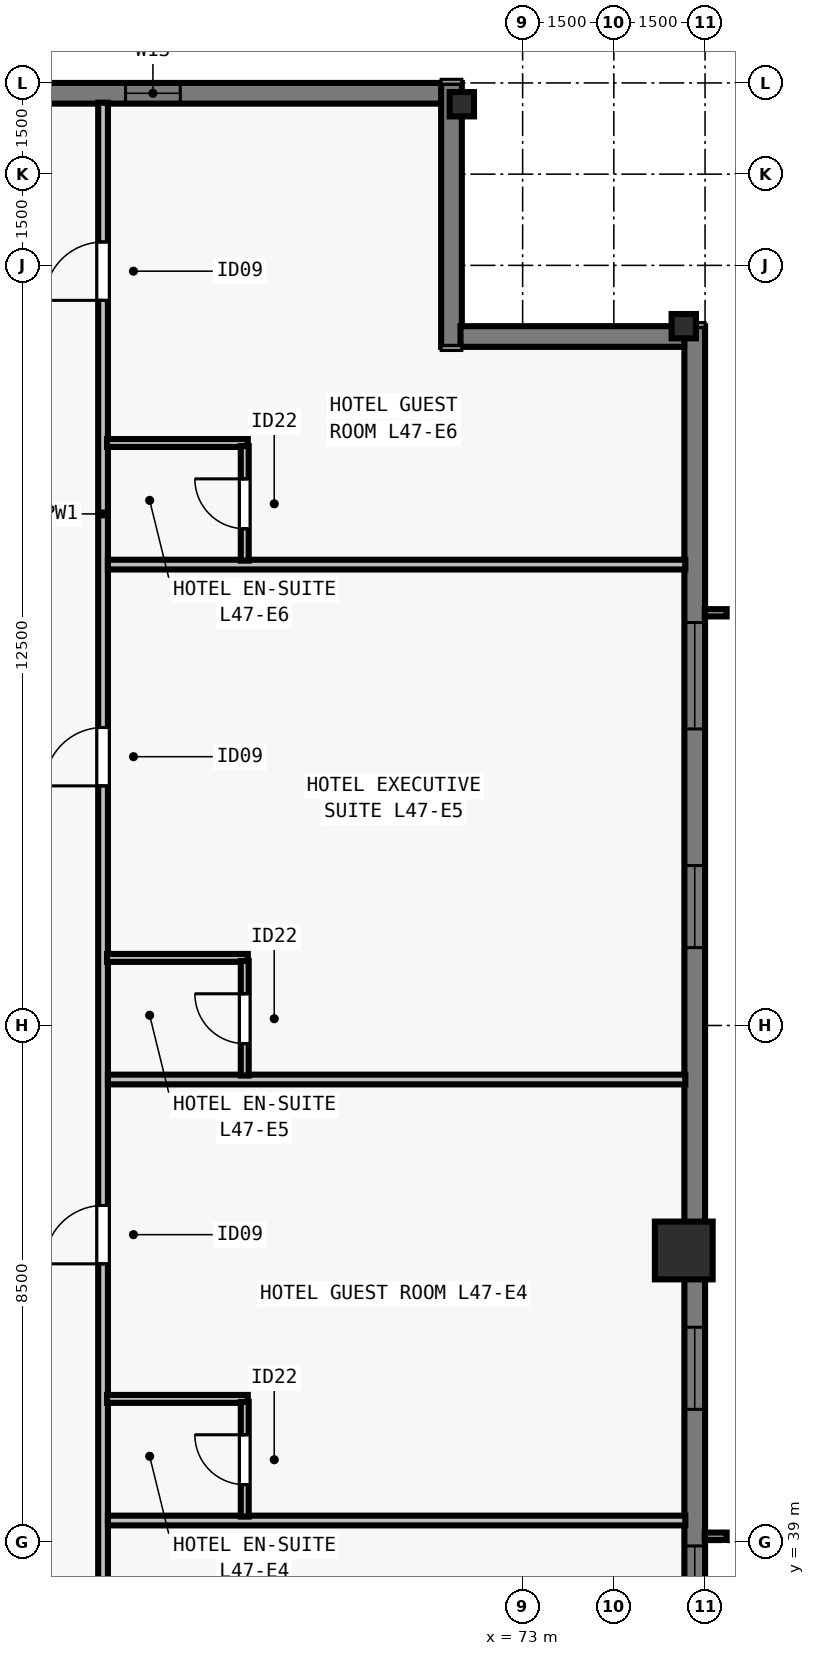
"""IFC4 building model, lengths in metres.
Left out: names, types, materials, properties, quantities, classifications, styles, units other than length and angle.
Written with IfcOpenShell. Run it as: python <this file> out.ifc"""

import sys

from ifc_helpers import new_model, si_unit, direction, frame, frame_2d, origin, origin_2d, place, context, subcontext, project, spatial, rectangle, i_section, extrude, element, fill, save


model = new_model("IFC4")
c1 = context("Model", 3, precision=1e-05, world=origin(), true_north=direction((0.0, 1.0)))
c2 = subcontext(c1, "Body", "Model", "MODEL_VIEW")
j1 = project(units=[si_unit("LENGTHUNIT", "METRE"), si_unit("PLANEANGLEUNIT", "RADIAN")], contexts=[c1])
p1 = place(None, origin())
s1 = spatial("IfcSite", under=j1, at=p1, CompositionType="ELEMENT")
p2 = place(p1, origin())
s2 = spatial("IfcBuilding", under=s1, at=p2, CompositionType="ELEMENT")
p3 = place(p2, frame((0.0, 0.0, 172.5)))
s3 = spatial("IfcBuildingStorey", under=s2, at=p3, CompositionType="ELEMENT", Elevation=172.5)
p4 = place(p3, frame((75.65, 43.8, 0.0), z_axis=(0.0, 0.0, 1.0), x_axis=(0.0, 1.0, 0.0)))
e1 = element("IfcColumn", 1, at=p4, inside=s3, PredefinedType="COLUMN", context=c2, shape_type="SweptSolid", body=[
    extrude(rectangle(XDim=0.95, YDim=0.95, at=origin_2d()), origin(), (0.0, 0.0, 1.0), 3.5),
])
for number, where, z_axis, x_axis in (
    (2, (75.65, 59.0, 0.0), (0.0, 0.0, 1.0), (0.0, 1.0, 0.0)),
    (3, (72.0, 62.65, 0.0), (0.0, 0.0, 1.0), (1.0, 0.0, 0.0)),
):
    element("IfcColumn", number, at=place(p3, frame(where, z_axis=z_axis, x_axis=x_axis)), inside=s3, PredefinedType="COLUMN", context=c2, shape_type="SweptSolid", body=[
        extrude(i_section(OverallWidth=0.4, OverallDepth=0.4, WebThickness=0.022, FlangeThickness=0.036, at=origin_2d()), origin(), (0.0, 0.0, 1.0), 3.5),
    ])
p5 = place(p3, frame((32.0, 62.83, 0.0), z_axis=(0.0, 0.0, 1.0), x_axis=(1.0, 0.0, 0.0)))
e4 = element("IfcWall", 4, at=p5, inside=s3, PredefinedType="SOLIDWALL", context=c2, shape_type="SweptSolid", body=[
    extrude(rectangle(XDim=39.682, YDim=0.34, at=frame_2d((19.841, 0.0))), origin(), (0.0, 0.0, 1.0), 3.28),
])
p6 = place(p5, frame((4.752, 0.0, 0.8)))
e5 = element("IfcOpeningElement", 5, at=p6, cuts=e4, PredefinedType="OPENING", context=c2, shape_type="SweptSolid", body=[
    extrude(rectangle(XDim=1.75, YDim=1.66, at=frame_2d((0.875, 0.83))), frame((0.0, 0.18, 0.0), z_axis=(0.0, -1.0, 0.0), x_axis=(1.0, 0.0, 0.0)), (0.0, 0.0, 1.0), 0.36),
])
p7 = place(p5, frame((8.055, 0.0, 0.8)))
e6 = element("IfcOpeningElement", 6, at=p7, cuts=e4, PredefinedType="OPENING", context=c2, shape_type="SweptSolid", body=[
    extrude(rectangle(XDim=1.35, YDim=1.66, at=frame_2d((0.675, 0.83))), frame((0.0, 0.18, 0.0), z_axis=(0.0, -1.0, 0.0), x_axis=(1.0, 0.0, 0.0)), (0.0, 0.0, 1.0), 0.36),
])
p8 = place(p5, frame((11.859, 0.0, 0.8)))
e7 = element("IfcOpeningElement", 7, at=p8, cuts=e4, PredefinedType="OPENING", context=c2, shape_type="SweptSolid", body=[
    extrude(rectangle(XDim=1.75, YDim=1.66, at=frame_2d((0.875, 0.83))), frame((0.0, 0.18, 0.0), z_axis=(0.0, -1.0, 0.0), x_axis=(1.0, 0.0, 0.0)), (0.0, 0.0, 1.0), 0.36),
])
p9 = place(p5, frame((18.966, 0.0, 0.8)))
e8 = element("IfcOpeningElement", 8, at=p9, cuts=e4, PredefinedType="OPENING", context=c2, shape_type="SweptSolid", body=[
    extrude(rectangle(XDim=1.75, YDim=1.66, at=frame_2d((0.875, 0.83))), frame((0.0, 0.18, 0.0), z_axis=(0.0, -1.0, 0.0), x_axis=(1.0, 0.0, 0.0)), (0.0, 0.0, 1.0), 0.36),
])
p10 = place(p5, frame((21.469, 0.0, 0.8)))
e9 = element("IfcOpeningElement", 9, at=p10, cuts=e4, PredefinedType="OPENING", context=c2, shape_type="SweptSolid", body=[
    extrude(rectangle(XDim=1.35, YDim=1.66, at=frame_2d((0.675, 0.83))), frame((0.0, 0.18, 0.0), z_axis=(0.0, -1.0, 0.0), x_axis=(1.0, 0.0, 0.0)), (0.0, 0.0, 1.0), 0.36),
])
p11 = place(p5, frame((26.073, 0.0, 0.8)))
e10 = element("IfcOpeningElement", 10, at=p11, cuts=e4, PredefinedType="OPENING", context=c2, shape_type="SweptSolid", body=[
    extrude(rectangle(XDim=1.75, YDim=1.66, at=frame_2d((0.875, 0.83))), frame((0.0, 0.18, 0.0), z_axis=(0.0, -1.0, 0.0), x_axis=(1.0, 0.0, 0.0)), (0.0, 0.0, 1.0), 0.36),
])
p12 = place(p5, frame((29.827, 0.0, 0.8)))
e11 = element("IfcOpeningElement", 11, at=p12, cuts=e4, PredefinedType="OPENING", context=c2, shape_type="SweptSolid", body=[
    extrude(rectangle(XDim=1.35, YDim=1.66, at=frame_2d((0.675, 0.83))), frame((0.0, 0.18, 0.0), z_axis=(0.0, -1.0, 0.0), x_axis=(1.0, 0.0, 0.0)), (0.0, 0.0, 1.0), 0.36),
])
p13 = place(p5, frame((34.47, 0.0, 0.8)))
e12 = element("IfcOpeningElement", 12, at=p13, cuts=e4, PredefinedType="OPENING", context=c2, shape_type="SweptSolid", body=[
    extrude(rectangle(XDim=0.9, YDim=1.66, at=frame_2d((0.45, 0.83))), frame((0.0, 0.18, 0.0), z_axis=(0.0, -1.0, 0.0), x_axis=(1.0, 0.0, 0.0)), (0.0, 0.0, 1.0), 0.36),
])
p14 = place(p3, frame((71.83, 63.0, 0.0), z_axis=(0.0, 0.0, 1.0), x_axis=(0.0, -1.0, 0.0)))
e13 = element("IfcWall", 13, at=p14, inside=s3, PredefinedType="SOLIDWALL", context=c2, shape_type="SweptSolid", body=[
    extrude(rectangle(XDim=4.34, YDim=0.34, at=frame_2d((2.17, 0.0))), origin(), (0.0, 0.0, 1.0), 3.28),
])
p15 = place(p3, frame((71.978, 58.83, 0.0), z_axis=(0.0, 0.0, 1.0), x_axis=(1.0, 0.0, 0.0)))
e14 = element("IfcWall", 14, at=p15, inside=s3, PredefinedType="SOLIDWALL", context=c2, shape_type="SweptSolid", body=[
    extrude(rectangle(XDim=3.704, YDim=0.34, at=frame_2d((1.852, 0.0))), origin(), (0.0, 0.0, 1.0), 3.28),
])
p16 = place(p3, frame((75.83, 59.0, 0.0), z_axis=(0.0, 0.0, 1.0), x_axis=(0.0, -1.0, 0.0)))
e15 = element("IfcWall", 15, at=p16, inside=s3, PredefinedType="SOLIDWALL", context=c2, shape_type="SweptSolid", body=[
    extrude(rectangle(XDim=26.682, YDim=0.34, at=frame_2d((13.341, 0.0))), origin(), (0.0, 0.0, 1.0), 3.28),
])
p17 = place(p16, frame((4.873, 0.0, 0.8)))
e16 = element("IfcOpeningElement", 16, at=p17, cuts=e15, PredefinedType="OPENING", context=c2, shape_type="SweptSolid", body=[
    extrude(rectangle(XDim=1.75, YDim=1.66, at=frame_2d((0.875, 0.83))), frame((0.0, 0.18, 0.0), z_axis=(0.0, -1.0, 0.0), x_axis=(1.0, 0.0, 0.0)), (0.0, 0.0, 1.0), 0.36),
])
p18 = place(p16, frame((8.87, 0.0, 0.8)))
e17 = element("IfcOpeningElement", 17, at=p18, cuts=e15, PredefinedType="OPENING", context=c2, shape_type="SweptSolid", body=[
    extrude(rectangle(XDim=1.35, YDim=1.66, at=frame_2d((0.675, 0.83))), frame((0.0, 0.18, 0.0), z_axis=(0.0, -1.0, 0.0), x_axis=(1.0, 0.0, 0.0)), (0.0, 0.0, 1.0), 0.36),
])
p19 = place(p16, frame((16.462, 0.0, 0.8)))
e18 = element("IfcOpeningElement", 18, at=p19, cuts=e15, PredefinedType="OPENING", context=c2, shape_type="SweptSolid", body=[
    extrude(rectangle(XDim=1.35, YDim=1.66, at=frame_2d((0.675, 0.83))), frame((0.0, 0.18, 0.0), z_axis=(0.0, -1.0, 0.0), x_axis=(1.0, 0.0, 0.0)), (0.0, 0.0, 1.0), 0.36),
])
p20 = place(p16, frame((20.059, 0.0, 0.8)))
e19 = element("IfcOpeningElement", 19, at=p20, cuts=e15, PredefinedType="OPENING", context=c2, shape_type="SweptSolid", body=[
    extrude(rectangle(XDim=1.75, YDim=1.66, at=frame_2d((0.875, 0.83))), frame((0.0, 0.18, 0.0), z_axis=(0.0, -1.0, 0.0), x_axis=(1.0, 0.0, 0.0)), (0.0, 0.0, 1.0), 0.36),
])
p21 = place(p3, frame((66.1, 15.325, 0.0), z_axis=(0.0, 0.0, 1.0), x_axis=(0.0, 1.0, 0.0)))
e20 = element("IfcWall", 20, at=p21, inside=s3, PredefinedType="PARTITIONING", context=c2, shape_type="SweptSolid", body=[
    extrude(rectangle(XDim=47.35, YDim=0.16, at=frame_2d((23.675, 0.0))), origin(), (0.0, 0.0, 1.0), 2.555),
])
p22 = place(p21, frame((5.025, 0.0, 0.0)))
e21 = element("IfcOpeningElement", 21, at=p22, cuts=e20, PredefinedType="OPENING", context=c2, shape_type="SweptSolid", body=[
    extrude(rectangle(XDim=0.96, YDim=2.15, at=frame_2d((0.48, 1.075))), frame((0.0, 0.09, 0.0), z_axis=(0.0, -1.0, 0.0), x_axis=(1.0, 0.0, 0.0)), (0.0, 0.0, 1.0), 0.18),
])
p23 = place(p21, frame((12.535, 0.0, 0.0)))
e22 = element("IfcOpeningElement", 22, at=p23, cuts=e20, PredefinedType="OPENING", context=c2, shape_type="SweptSolid", body=[
    extrude(rectangle(XDim=0.96, YDim=2.15, at=frame_2d((0.48, 1.075))), frame((0.0, 0.09, 0.0), z_axis=(0.0, -1.0, 0.0), x_axis=(1.0, 0.0, 0.0)), (0.0, 0.0, 1.0), 0.18),
])
p24 = place(p21, frame((20.395, 0.0, 0.0)))
e23 = element("IfcOpeningElement", 23, at=p24, cuts=e20, PredefinedType="OPENING", context=c2, shape_type="SweptSolid", body=[
    extrude(rectangle(XDim=0.96, YDim=2.15, at=frame_2d((0.48, 1.075))), frame((0.0, 0.09, 0.0), z_axis=(0.0, -1.0, 0.0), x_axis=(1.0, 0.0, 0.0)), (0.0, 0.0, 1.0), 0.18),
])
p25 = place(p21, frame((28.255, 0.0, 0.0)))
e24 = element("IfcOpeningElement", 24, at=p25, cuts=e20, PredefinedType="OPENING", context=c2, shape_type="SweptSolid", body=[
    extrude(rectangle(XDim=0.96, YDim=2.15, at=frame_2d((0.48, 1.075))), frame((0.0, 0.09, 0.0), z_axis=(0.0, -1.0, 0.0), x_axis=(1.0, 0.0, 0.0)), (0.0, 0.0, 1.0), 0.18),
])
p26 = place(p21, frame((36.115, 0.0, 0.0)))
e25 = element("IfcOpeningElement", 25, at=p26, cuts=e20, PredefinedType="OPENING", context=c2, shape_type="SweptSolid", body=[
    extrude(rectangle(XDim=0.96, YDim=2.15, at=frame_2d((0.48, 1.075))), frame((0.0, 0.09, 0.0), z_axis=(0.0, -1.0, 0.0), x_axis=(1.0, 0.0, 0.0)), (0.0, 0.0, 1.0), 0.18),
])
p27 = place(p21, frame((44.1, 0.0, 0.0)))
e26 = element("IfcOpeningElement", 26, at=p27, cuts=e20, PredefinedType="OPENING", context=c2, shape_type="SweptSolid", body=[
    extrude(rectangle(XDim=0.96, YDim=2.15, at=frame_2d((0.48, 1.075))), frame((0.0, 0.09, 0.0), z_axis=(0.0, -1.0, 0.0), x_axis=(1.0, 0.0, 0.0)), (0.0, 0.0, 1.0), 0.18),
])
p28 = place(p3, frame((66.18, 39.359, 0.0), z_axis=(0.0, 0.0, 1.0), x_axis=(1.0, 0.0, 0.0)))
e27 = element("IfcWall", 27, at=p28, inside=s3, PredefinedType="PARTITIONING", context=c2, shape_type="SweptSolid", body=[
    extrude(rectangle(XDim=9.495, YDim=0.16, at=frame_2d((4.748, 0.0))), origin(), (0.0, 0.0, 1.0), 3.28),
])
p29 = place(p3, frame((66.165, 41.359, 0.0), z_axis=(0.0, 0.0, 1.0), x_axis=(1.0, 0.0, 0.0)))
e28 = element("IfcWall", 28, at=p29, inside=s3, PredefinedType="PLUMBINGWALL", context=c2, shape_type="SweptSolid", body=[
    extrude(rectangle(XDim=2.315, YDim=0.13, at=frame_2d((1.157, 0.0))), origin(), (0.0, 0.0, 1.0), 3.28),
])
p30 = place(p3, frame((68.43, 39.424, 0.0), z_axis=(0.0, 0.0, 1.0), x_axis=(0.0, 1.0, 0.0)))
e29 = element("IfcWall", 29, at=p30, inside=s3, PredefinedType="PLUMBINGWALL", context=c2, shape_type="SweptSolid", body=[
    extrude(rectangle(XDim=1.885, YDim=0.13, at=frame_2d((0.942, 0.0))), origin(), (0.0, 0.0, 1.0), 3.28),
])
p31 = place(p30, frame((0.525, 0.0, 0.0)))
e30 = element("IfcOpeningElement", 30, at=p31, cuts=e29, PredefinedType="OPENING", context=c2, shape_type="SweptSolid", body=[
    extrude(rectangle(XDim=0.82, YDim=2.1, at=frame_2d((0.41, 1.05))), frame((0.0, 0.075, 0.0), z_axis=(0.0, -1.0, 0.0), x_axis=(1.0, 0.0, 0.0)), (0.0, 0.0, 1.0), 0.15),
])
p32 = place(p3, frame((66.18, 46.611, 0.0), z_axis=(0.0, 0.0, 1.0), x_axis=(1.0, 0.0, 0.0)))
e31 = element("IfcWall", 31, at=p32, inside=s3, PredefinedType="PARTITIONING", context=c2, shape_type="SweptSolid", body=[
    extrude(rectangle(XDim=9.495, YDim=0.16, at=frame_2d((4.748, 0.0))), origin(), (0.0, 0.0, 1.0), 3.28),
])
p33 = place(p3, frame((66.165, 48.611, 0.0), z_axis=(0.0, 0.0, 1.0), x_axis=(1.0, 0.0, 0.0)))
e32 = element("IfcWall", 32, at=p33, inside=s3, PredefinedType="PLUMBINGWALL", context=c2, shape_type="SweptSolid", body=[
    extrude(rectangle(XDim=2.315, YDim=0.13, at=frame_2d((1.157, 0.0))), origin(), (0.0, 0.0, 1.0), 3.28),
])
p34 = place(p3, frame((68.43, 46.677, 0.0), z_axis=(0.0, 0.0, 1.0), x_axis=(0.0, 1.0, 0.0)))
e33 = element("IfcWall", 33, at=p34, inside=s3, PredefinedType="PLUMBINGWALL", context=c2, shape_type="SweptSolid", body=[
    extrude(rectangle(XDim=1.885, YDim=0.13, at=frame_2d((0.942, 0.0))), origin(), (0.0, 0.0, 1.0), 3.28),
])
p35 = place(p34, frame((0.525, 0.0, 0.0)))
e34 = element("IfcOpeningElement", 34, at=p35, cuts=e33, PredefinedType="OPENING", context=c2, shape_type="SweptSolid", body=[
    extrude(rectangle(XDim=0.82, YDim=2.1, at=frame_2d((0.41, 1.05))), frame((0.0, 0.075, 0.0), z_axis=(0.0, -1.0, 0.0), x_axis=(1.0, 0.0, 0.0)), (0.0, 0.0, 1.0), 0.15),
])
p36 = place(p3, frame((66.18, 55.079, 0.0), z_axis=(0.0, 0.0, 1.0), x_axis=(1.0, 0.0, 0.0)))
e35 = element("IfcWall", 35, at=p36, inside=s3, PredefinedType="PARTITIONING", context=c2, shape_type="SweptSolid", body=[
    extrude(rectangle(XDim=9.495, YDim=0.16, at=frame_2d((4.748, 0.0))), origin(), (0.0, 0.0, 1.0), 2.896),
])
p37 = place(p3, frame((66.165, 57.079, 0.0), z_axis=(0.0, 0.0, 1.0), x_axis=(1.0, 0.0, 0.0)))
e36 = element("IfcWall", 36, at=p37, inside=s3, PredefinedType="PLUMBINGWALL", context=c2, shape_type="SweptSolid", body=[
    extrude(rectangle(XDim=2.315, YDim=0.13, at=frame_2d((1.157, 0.0))), origin(), (0.0, 0.0, 1.0), 3.28),
])
p38 = place(p3, frame((68.43, 55.144, 0.0), z_axis=(0.0, 0.0, 1.0), x_axis=(0.0, 1.0, 0.0)))
e37 = element("IfcWall", 37, at=p38, inside=s3, PredefinedType="PLUMBINGWALL", context=c2, shape_type="SweptSolid", body=[
    extrude(rectangle(XDim=1.885, YDim=0.13, at=frame_2d((0.942, 0.0))), origin(), (0.0, 0.0, 1.0), 3.28),
])
p39 = place(p38, frame((0.525, 0.0, 0.0)))
e38 = element("IfcOpeningElement", 38, at=p39, cuts=e37, PredefinedType="OPENING", context=c2, shape_type="SweptSolid", body=[
    extrude(rectangle(XDim=0.82, YDim=2.1, at=frame_2d((0.41, 1.05))), frame((0.0, 0.075, 0.0), z_axis=(0.0, -1.0, 0.0), x_axis=(1.0, 0.0, 0.0)), (0.0, 0.0, 1.0), 0.15),
])
p40 = place(p17, origin())
e39 = element("IfcWindow", 39, at=p40, inside=s3, PartitioningType="SINGLE_PANEL", PredefinedType="WINDOW", context=c2, shape_type="SweptSolid", body=[
    extrude(rectangle(XDim=1.75, YDim=1.66, at=frame_2d((0.875, 0.83))), frame((0.0, -0.05, 0.0), z_axis=(0.0, -1.0, 0.0), x_axis=(1.0, 0.0, 0.0)), (0.0, 0.0, 1.0), 0.06),
])
fill(e16, e39)
p41 = place(p18, origin())
e40 = element("IfcWindow", 40, at=p41, inside=s3, PartitioningType="SINGLE_PANEL", PredefinedType="WINDOW", context=c2, shape_type="SweptSolid", body=[
    extrude(rectangle(XDim=1.35, YDim=1.66, at=frame_2d((0.675, 0.83))), frame((0.0, -0.05, 0.0), z_axis=(0.0, -1.0, 0.0), x_axis=(1.0, 0.0, 0.0)), (0.0, 0.0, 1.0), 0.06),
])
fill(e17, e40)
p42 = place(p19, origin())
e41 = element("IfcWindow", 41, at=p42, inside=s3, PartitioningType="SINGLE_PANEL", PredefinedType="WINDOW", context=c2, shape_type="SweptSolid", body=[
    extrude(rectangle(XDim=1.35, YDim=1.66, at=frame_2d((0.675, 0.83))), frame((0.0, -0.05, 0.0), z_axis=(0.0, -1.0, 0.0), x_axis=(1.0, 0.0, 0.0)), (0.0, 0.0, 1.0), 0.06),
])
fill(e18, e41)
p43 = place(p20, origin())
e42 = element("IfcWindow", 42, at=p43, inside=s3, PartitioningType="SINGLE_PANEL", PredefinedType="WINDOW", context=c2, shape_type="SweptSolid", body=[
    extrude(rectangle(XDim=1.75, YDim=1.66, at=frame_2d((0.875, 0.83))), frame((0.0, -0.05, 0.0), z_axis=(0.0, -1.0, 0.0), x_axis=(1.0, 0.0, 0.0)), (0.0, 0.0, 1.0), 0.06),
])
fill(e19, e42)
p44 = place(p13, origin())
e43 = element("IfcWindow", 43, at=p44, inside=s3, PartitioningType="SINGLE_PANEL", PredefinedType="WINDOW", context=c2, shape_type="SweptSolid", body=[
    extrude(rectangle(XDim=0.9, YDim=1.66, at=frame_2d((0.45, 0.83))), frame((0.0, -0.04, 0.0), z_axis=(0.0, -1.0, 0.0), x_axis=(1.0, 0.0, 0.0)), (0.0, 0.0, 1.0), 0.06),
])
fill(e12, e43)
p45 = place(p31, origin())
e44 = element("IfcDoor", 44, at=p45, inside=s3, OperationType="SINGLE_SWING_RIGHT", PredefinedType="DOOR", context=c2, shape_type="SweptSolid", body=[
    extrude(rectangle(XDim=0.82, YDim=2.1, at=frame_2d((0.41, 1.05))), frame((0.0, 0.025, 0.0), z_axis=(0.0, -1.0, 0.0), x_axis=(1.0, 0.0, 0.0)), (0.0, 0.0, 1.0), 0.05),
])
fill(e30, e44)
p46 = place(p25, origin())
e45 = element("IfcDoor", 45, at=p46, inside=s3, OperationType="SINGLE_SWING_LEFT", PredefinedType="DOOR", context=c2, shape_type="SweptSolid", body=[
    extrude(rectangle(XDim=0.96, YDim=2.15, at=frame_2d((0.48, 1.075))), frame((0.0, 0.025, 0.0), z_axis=(0.0, -1.0, 0.0), x_axis=(1.0, 0.0, 0.0)), (0.0, 0.0, 1.0), 0.05),
])
fill(e24, e45)
p47 = place(p35, origin())
e46 = element("IfcDoor", 46, at=p47, inside=s3, OperationType="SINGLE_SWING_RIGHT", PredefinedType="DOOR", context=c2, shape_type="SweptSolid", body=[
    extrude(rectangle(XDim=0.82, YDim=2.1, at=frame_2d((0.41, 1.05))), frame((0.0, 0.025, 0.0), z_axis=(0.0, -1.0, 0.0), x_axis=(1.0, 0.0, 0.0)), (0.0, 0.0, 1.0), 0.05),
])
fill(e34, e46)
p48 = place(p26, origin())
e47 = element("IfcDoor", 47, at=p48, inside=s3, OperationType="SINGLE_SWING_LEFT", PredefinedType="DOOR", context=c2, shape_type="SweptSolid", body=[
    extrude(rectangle(XDim=0.96, YDim=2.15, at=frame_2d((0.48, 1.075))), frame((0.0, 0.025, 0.0), z_axis=(0.0, -1.0, 0.0), x_axis=(1.0, 0.0, 0.0)), (0.0, 0.0, 1.0), 0.05),
])
fill(e25, e47)
p49 = place(p39, origin())
e48 = element("IfcDoor", 48, at=p49, inside=s3, OperationType="SINGLE_SWING_RIGHT", PredefinedType="DOOR", context=c2, shape_type="SweptSolid", body=[
    extrude(rectangle(XDim=0.82, YDim=2.1, at=frame_2d((0.41, 1.05))), frame((0.0, 0.025, 0.0), z_axis=(0.0, -1.0, 0.0), x_axis=(1.0, 0.0, 0.0)), (0.0, 0.0, 1.0), 0.05),
])
fill(e38, e48)
p50 = place(p27, origin())
e49 = element("IfcDoor", 49, at=p50, inside=s3, OperationType="SINGLE_SWING_LEFT", PredefinedType="DOOR", context=c2, shape_type="SweptSolid", body=[
    extrude(rectangle(XDim=0.96, YDim=2.15, at=frame_2d((0.48, 1.075))), frame((0.0, 0.025, 0.0), z_axis=(0.0, -1.0, 0.0), x_axis=(1.0, 0.0, 0.0)), (0.0, 0.0, 1.0), 0.05),
])
fill(e26, e49)
save(model, sys.argv[1])
